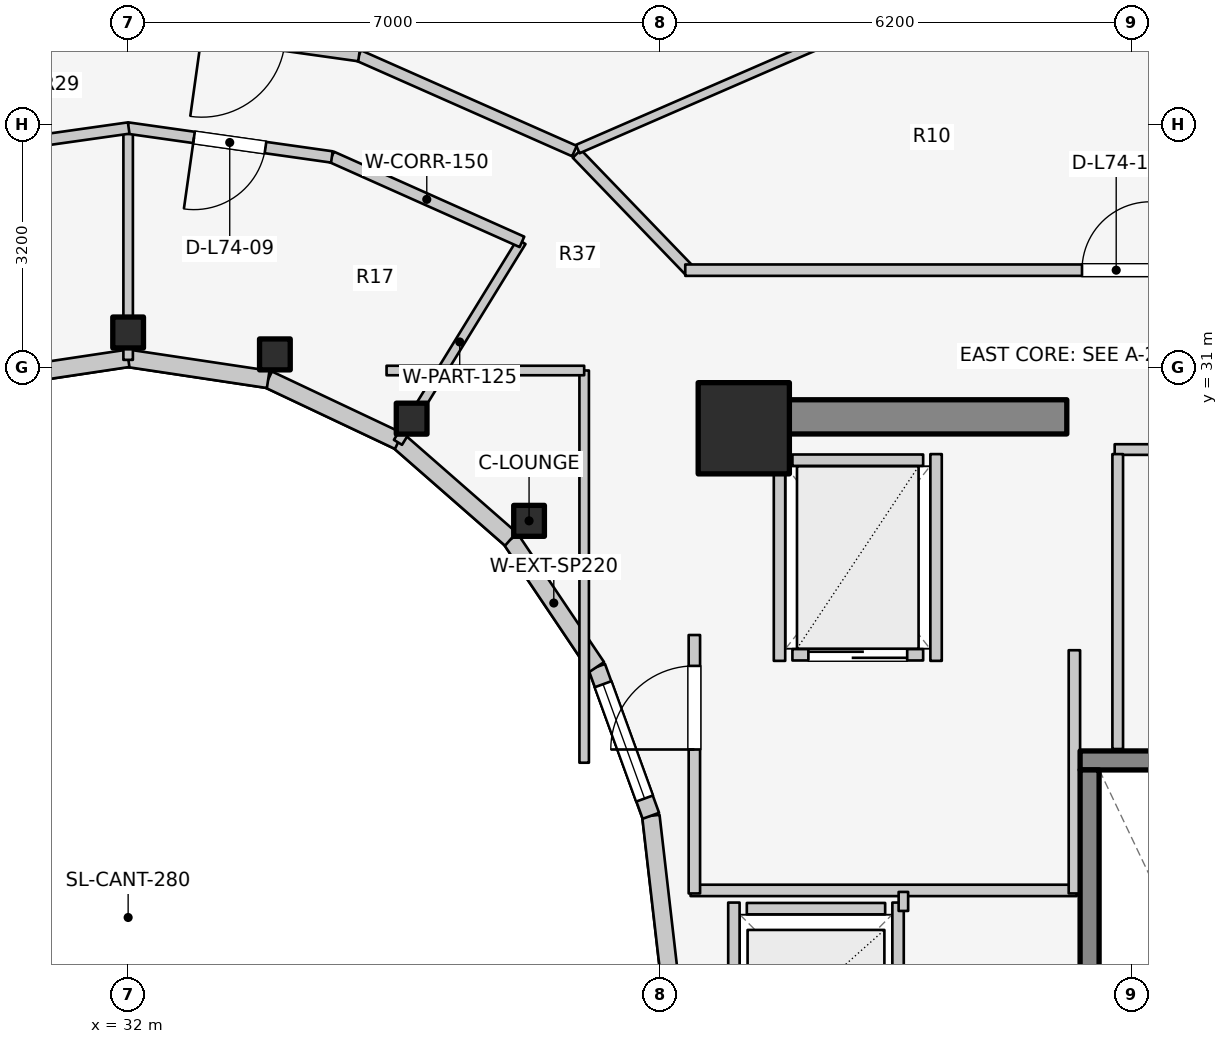
"""IFC4 building model, lengths in metres.
Left out: names, types, materials, properties, quantities, classifications, styles, units other than length and angle.
Written with IfcOpenShell. Run it as: python <this file> out.ifc"""

import sys

from ifc_helpers import new_model, si_unit, direction, frame, frame_2d, origin, origin_2d, place, context, subcontext, project, spatial, rectangle, i_section, extrude, element, fill, save


model = new_model("IFC4")
c1 = context("Model", 3, precision=1e-05, world=origin(), true_north=direction((0.0, 1.0)))
c2 = subcontext(c1, "Body", "Model", "MODEL_VIEW")
j1 = project(units=[si_unit("LENGTHUNIT", "METRE"), si_unit("PLANEANGLEUNIT", "RADIAN")], contexts=[c1])
p1 = place(None, origin())
s1 = spatial("IfcSite", under=j1, at=p1, CompositionType="ELEMENT")
p2 = place(p1, origin())
s2 = spatial("IfcBuilding", under=s1, at=p2, CompositionType="ELEMENT")
p3 = place(p2, frame((0.0, 0.0, 242.4)))
s3 = spatial("IfcBuildingStorey", under=s2, at=p3, CompositionType="ELEMENT", Elevation=242.4)
p4 = place(p3, frame((39.85, 30.35, 0.0), z_axis=(0.0, 0.0, 1.0), x_axis=(1.0, 0.0, 0.0)))
e1 = element("IfcWall", 1, at=p4, inside=s3, PredefinedType="SHEAR", context=c2, shape_type="SweptSolid", body=[
    extrude(rectangle(XDim=4.5, YDim=0.45, at=frame_2d((2.25, 0.0))), origin(), (0.0, 0.0, 1.0), 3.6),
])
p5 = place(p3, frame((44.525, 25.83, 0.0), z_axis=(0.0, 0.0, 1.0), x_axis=(1.0, 0.0, 0.0)))
e2 = element("IfcWall", 2, at=p5, inside=s3, PredefinedType="SOLIDWALL", context=c2, shape_type="SweptSolid", body=[
    extrude(rectangle(XDim=3.37, YDim=0.25, at=frame_2d((1.685, 0.0))), origin(), (0.0, 0.0, 1.0), 3.6),
])
p6 = place(p3, frame((44.65, 17.895, 0.0), z_axis=(0.0, 0.0, 1.0), x_axis=(0.0, 1.0, 0.0)))
e3 = element("IfcWall", 3, at=p6, inside=s3, PredefinedType="SOLIDWALL", context=c2, shape_type="SweptSolid", body=[
    extrude(rectangle(XDim=7.81, YDim=0.25, at=frame_2d((3.905, 0.0))), origin(), (0.0, 0.0, 1.0), 3.6),
])
p7 = place(p3, frame((40.1, 30.2, 0.0), z_axis=(0.0, 0.0, 1.0), x_axis=(1.0, 0.0, 0.0)))
e4 = element("IfcColumn", 4, at=p7, inside=s3, PredefinedType="COLUMN", context=c2, shape_type="SweptSolid", body=[
    extrude(rectangle(XDim=1.2, YDim=1.2, at=origin_2d()), origin(), (0.0, 0.0, 1.0), 3.6),
])
for number, where, z_axis, x_axis in (
    (5, (37.275, 28.982, 0.0), (0.0, 0.0, 1.0), (1.0, 0.0, 0.0)),
    (6, (35.73, 30.327, 0.0), (0.0, 0.0, 1.0), (1.0, 0.0, 0.0)),
    (7, (33.931, 31.172, 0.0), (0.0, 0.0, 1.0), (1.0, 0.0, 0.0)),
    (8, (32.0, 31.46, 0.0), (0.0, 0.0, 1.0), (1.0, 0.0, 0.0)),
):
    element("IfcColumn", number, at=place(p3, frame(where, z_axis=z_axis, x_axis=x_axis)), inside=s3, PredefinedType="COLUMN", context=c2, shape_type="SweptSolid", body=[
        extrude(i_section(OverallWidth=0.404, OverallDepth=0.407, WebThickness=0.027, FlangeThickness=0.044, FilletRadius=0.025, at=origin_2d()), origin(), (0.0, 0.0, 1.0), 3.6),
    ])
p8 = place(p3, frame((39.12, 23.0, 0.0), z_axis=(0.0, 0.0, 1.0), x_axis=(-0.114711713601, 0.993398823617, 0.0)))
e9 = element("IfcWall", 9, at=p8, inside=s3, PredefinedType="STANDARD", context=c2, shape_type="SweptSolid", body=[
    extrude(rectangle(XDim=2.115, YDim=0.23, at=frame_2d((1.058, 0.0))), origin(), (0.0, 0.0, 1.0), 3.28),
])
p9 = place(p3, frame((38.877, 25.102, 0.0), z_axis=(0.0, 0.0, 1.0), x_axis=(-0.341423187295, 0.93990968033, 0.0)))
e10 = element("IfcWall", 10, at=p9, inside=s3, PredefinedType="STANDARD", context=c2, shape_type="SweptSolid", body=[
    extrude(rectangle(XDim=2.084, YDim=0.23, at=frame_2d((1.042, 0.0))), origin(), (0.0, 0.0, 1.0), 3.28),
])
p10 = place(p9, frame((0.242, 0.0, 0.85)))
e11 = element("IfcOpeningElement", 11, at=p10, cuts=e10, PredefinedType="OPENING", context=c2, shape_type="SweptSolid", body=[
    extrude(rectangle(XDim=1.6, YDim=1.65, at=frame_2d((0.8, 0.825))), frame((0.0, 0.125, 0.0), z_axis=(0.0, -1.0, 0.0), x_axis=(1.0, 0.0, 0.0)), (0.0, 0.0, 1.0), 0.25),
])
p11 = place(p3, frame((38.166, 27.06, 0.0), z_axis=(0.0, 0.0, 1.0), x_axis=(-0.558197800898, 0.829707909492, 0.0)))
e12 = element("IfcWall", 12, at=p11, inside=s3, PredefinedType="STANDARD", context=c2, shape_type="SweptSolid", body=[
    extrude(rectangle(XDim=2.027, YDim=0.23, at=frame_2d((1.013, 0.0))), origin(), (0.0, 0.0, 1.0), 2.6),
])
p12 = place(p3, frame((37.035, 28.742, 0.0), z_axis=(0.0, 0.0, 1.0), x_axis=(-0.752576694707, 0.658504607869, 0.0)))
e13 = element("IfcWall", 13, at=p12, inside=s3, PredefinedType="STANDARD", context=c2, shape_type="SweptSolid", body=[
    extrude(rectangle(XDim=1.959, YDim=0.23, at=frame_2d((0.98, 0.0))), origin(), (0.0, 0.0, 1.0), 2.6),
])
p13 = place(p3, frame((35.56, 30.032, 0.0), z_axis=(0.0, 0.0, 1.0), x_axis=(-0.904179699603, 0.427152280606, 0.0)))
e14 = element("IfcWall", 14, at=p13, inside=s3, PredefinedType="STANDARD", context=c2, shape_type="SweptSolid", body=[
    extrude(rectangle(XDim=1.899, YDim=0.23, at=frame_2d((0.95, 0.0))), origin(), (0.0, 0.0, 1.0), 2.6),
])
for number, where, z_axis, x_axis in (
    (15, (33.843, 30.843, 0.0), (0.0, 0.0, 1.0), (-0.989, 0.149, 0.0)),
    (16, (32.0, 31.12, 0.0), (0.0, 0.0, 1.0), (-0.989, -0.149, 0.0)),
):
    element("IfcWall", number, at=place(p3, frame(where, z_axis=z_axis, x_axis=x_axis)), inside=s3, PredefinedType="STANDARD", context=c2, shape_type="SweptSolid", body=[
        extrude(rectangle(XDim=1.864, YDim=0.23, at=frame_2d((0.932, 0.0))), origin(), (0.0, 0.0, 1.0), 2.6),
    ])
p14 = place(p3, frame((47.558, 34.572, 0.0), z_axis=(0.0, 0.0, 1.0), x_axis=(-0.668903560134, 0.743349196031, 0.0)))
e17 = element("IfcWall", 17, at=p14, inside=s3, PredefinedType="STANDARD", context=c2, shape_type="SweptSolid", body=[
    extrude(rectangle(XDim=5.513, YDim=0.26, at=frame_2d((2.756, 0.0))), origin(), (0.0, 0.0, 1.0), 3.29),
])
p15 = place(p3, frame((40.14, 23.88, 0.0), z_axis=(0.0, 0.0, 1.0), x_axis=(1.0, 0.0, 0.0)))
e18 = element("IfcWall", 18, at=p15, inside=s3, PredefinedType="SOLIDWALL", context=c2, shape_type="SweptSolid", body=[
    extrude(rectangle(XDim=1.82, YDim=0.15, at=frame_2d((0.91, 0.0))), origin(), (0.0, 0.0, 1.0), 2.62),
])
p16 = place(p3, frame((39.97, 21.64, 0.0), z_axis=(0.0, 0.0, 1.0), x_axis=(0.0, 1.0, 0.0)))
e19 = element("IfcWall", 19, at=p16, inside=s3, PredefinedType="SOLIDWALL", context=c2, shape_type="SweptSolid", body=[
    extrude(rectangle(XDim=2.32, YDim=0.15, at=frame_2d((1.16, 0.0))), origin(), (0.0, 0.0, 1.0), 2.62),
])
p17 = place(p3, frame((42.13, 21.64, 0.0), z_axis=(0.0, 0.0, 1.0), x_axis=(0.0, 1.0, 0.0)))
e20 = element("IfcWall", 20, at=p17, inside=s3, PredefinedType="SOLIDWALL", context=c2, shape_type="SweptSolid", body=[
    extrude(rectangle(XDim=2.32, YDim=0.15, at=frame_2d((1.16, 0.0))), origin(), (0.0, 0.0, 1.0), 3.295),
])
p18 = place(p3, frame((40.74, 27.22, 0.0), z_axis=(0.0, 0.0, 1.0), x_axis=(1.0, 0.0, 0.0)))
e21 = element("IfcWall", 21, at=p18, inside=s3, PredefinedType="SOLIDWALL", context=c2, shape_type="SweptSolid", body=[
    extrude(rectangle(XDim=1.72, YDim=0.15, at=frame_2d((0.86, 0.0))), origin(), (0.0, 0.0, 1.0), 3.295),
])
p19 = place(p18, frame((0.21, 0.0, 0.0)))
e22 = element("IfcOpeningElement", 22, at=p19, cuts=e21, PredefinedType="OPENING", context=c2, shape_type="SweptSolid", body=[
    extrude(rectangle(XDim=1.3, YDim=2.1, at=frame_2d((0.65, 1.05))), frame((0.0, 0.085, 0.0), z_axis=(0.0, -1.0, 0.0), x_axis=(1.0, 0.0, 0.0)), (0.0, 0.0, 1.0), 0.17),
])
p20 = place(p3, frame((40.74, 29.78, 0.0), z_axis=(0.0, 0.0, 1.0), x_axis=(1.0, 0.0, 0.0)))
e23 = element("IfcWall", 23, at=p20, inside=s3, PredefinedType="SOLIDWALL", context=c2, shape_type="SweptSolid", body=[
    extrude(rectangle(XDim=1.72, YDim=0.15, at=frame_2d((0.86, 0.0))), origin(), (0.0, 0.0, 1.0), 3.295),
])
for number, where, z_axis, x_axis in (
    (24, (40.57, 27.14, 0.0), (0.0, 0.0, 1.0), (0.0, 1.0, 0.0)),
    (25, (42.63, 27.14, 0.0), (0.0, 0.0, 1.0), (0.0, 1.0, 0.0)),
):
    element("IfcWall", number, at=place(p3, frame(where, z_axis=z_axis, x_axis=x_axis)), inside=s3, PredefinedType="SOLIDWALL", context=c2, shape_type="SweptSolid", body=[
        extrude(rectangle(XDim=2.72, YDim=0.15, at=frame_2d((1.36, 0.0))), origin(), (0.0, 0.0, 1.0), 3.295),
    ])
p21 = place(p3, frame((39.4, 24.12, 0.0), z_axis=(0.0, 0.0, 1.0), x_axis=(1.0, 0.0, 0.0)))
e26 = element("IfcWall", 26, at=p21, inside=s3, PredefinedType="PARTITIONING", context=c2, shape_type="SweptSolid", body=[
    extrude(rectangle(XDim=5.08, YDim=0.15, at=frame_2d((2.54, 0.0))), origin(), (0.0, 0.0, 1.0), 2.62),
])
p22 = place(p3, frame((44.45, 24.08, 0.0), z_axis=(0.0, 0.0, 1.0), x_axis=(0.0, 1.0, 0.0)))
e27 = element("IfcWall", 27, at=p22, inside=s3, PredefinedType="PARTITIONING", context=c2, shape_type="SweptSolid", body=[
    extrude(rectangle(XDim=3.2, YDim=0.15, at=frame_2d((1.6, 0.0))), origin(), (0.0, 0.0, 1.0), 3.295),
])
p23 = place(p3, frame((39.45, 24.08, 0.0), z_axis=(0.0, 0.0, 1.0), x_axis=(0.0, 1.0, 0.0)))
e28 = element("IfcWall", 28, at=p23, inside=s3, PredefinedType="PARTITIONING", context=c2, shape_type="SweptSolid", body=[
    extrude(rectangle(XDim=3.4, YDim=0.15, at=frame_2d((1.7, 0.0))), origin(), (0.0, 0.0, 1.0), 3.295),
])
p24 = place(p23, frame((1.894, 0.0, 0.0)))
e29 = element("IfcOpeningElement", 29, at=p24, cuts=e28, PredefinedType="OPENING", context=c2, shape_type="SweptSolid", body=[
    extrude(rectangle(XDim=1.1, YDim=2.1, at=frame_2d((0.55, 1.05))), frame((0.0, 0.085, 0.0), z_axis=(0.0, -1.0, 0.0), x_axis=(1.0, 0.0, 0.0)), (0.0, 0.0, 1.0), 0.17),
])
p25 = place(p3, frame((42.2, 23.85, 0.0), z_axis=(0.0, 0.0, 1.0), x_axis=(0.0, 1.0, 0.0)))
e30 = element("IfcWall", 30, at=p25, inside=s3, PredefinedType="PARTITIONING", context=c2, shape_type="SweptSolid", body=[
    extrude(rectangle(XDim=0.25, YDim=0.125, at=frame_2d((0.125, 0.0))), origin(), (0.0, 0.0, 1.0), 3.295),
])
p26 = place(p3, frame((44.98, 29.92, 0.0), z_axis=(0.0, 0.0, 1.0), x_axis=(1.0, 0.0, 0.0)))
e31 = element("IfcWall", 31, at=p26, inside=s3, PredefinedType="PLUMBINGWALL", context=c2, shape_type="SweptSolid", body=[
    extrude(rectangle(XDim=2.9, YDim=0.14, at=frame_2d((1.45, 0.0))), origin(), (0.0, 0.0, 1.0), 3.295),
])
p27 = place(p26, frame((0.686, 0.0, 0.0)))
e32 = element("IfcOpeningElement", 32, at=p27, cuts=e31, PredefinedType="OPENING", context=c2, shape_type="SweptSolid", body=[
    extrude(rectangle(XDim=0.85, YDim=2.05, at=frame_2d((0.425, 1.025))), frame((0.0, 0.08, 0.0), z_axis=(0.0, -1.0, 0.0), x_axis=(1.0, 0.0, 0.0)), (0.0, 0.0, 1.0), 0.16),
])
p28 = place(p3, frame((45.02, 25.98, 0.0), z_axis=(0.0, 0.0, 1.0), x_axis=(0.0, 1.0, 0.0)))
e33 = element("IfcWall", 33, at=p28, inside=s3, PredefinedType="PLUMBINGWALL", context=c2, shape_type="SweptSolid", body=[
    extrude(rectangle(XDim=3.88, YDim=0.14, at=frame_2d((1.94, 0.0))), origin(), (0.0, 0.0, 1.0), 3.295),
])
p29 = place(p3, frame((35.55, 30.015, 0.0), z_axis=(0.0, 0.0, 1.0), x_axis=(0.523992004803, 0.851723182086, 0.0)))
e34 = element("IfcWall", 34, at=p29, inside=s3, PredefinedType="PARTITIONING", context=c2, shape_type="SweptSolid", body=[
    extrude(rectangle(XDim=3.101, YDim=0.125, at=frame_2d((1.551, 0.0))), origin(), (0.0, 0.0, 1.0), 2.672),
])
p30 = place(p3, frame((32.0, 31.1, 0.0), z_axis=(0.0, 0.0, 1.0), x_axis=(0.0, 1.0, 0.0)))
e35 = element("IfcWall", 35, at=p30, inside=s3, PredefinedType="PARTITIONING", context=c2, shape_type="SweptSolid", body=[
    extrude(rectangle(XDim=3.05, YDim=0.125, at=frame_2d((1.525, 0.0))), origin(), (0.0, 0.0, 1.0), 2.672),
])
p31 = place(p3, frame((37.181, 32.652, 0.0), z_axis=(0.0, 0.0, 1.0), x_axis=(-0.913120130558, 0.407690602257, 0.0)))
e36 = element("IfcWall", 36, at=p31, inside=s3, PredefinedType="PARTITIONING", context=c2, shape_type="SweptSolid", body=[
    extrude(rectangle(XDim=2.743, YDim=0.15, at=frame_2d((1.371, 0.0))), origin(), (0.0, 0.0, 1.0), 2.823),
])
p32 = place(p3, frame((34.68, 33.77, 0.0), z_axis=(0.0, 0.0, 1.0), x_axis=(-0.990132151456, 0.140136799779, 0.0)))
e37 = element("IfcWall", 37, at=p32, inside=s3, PredefinedType="PARTITIONING", context=c2, shape_type="SweptSolid", body=[
    extrude(rectangle(XDim=2.714, YDim=0.15, at=frame_2d((1.357, 0.0))), origin(), (0.0, 0.0, 1.0), 2.823),
])
p33 = place(p32, frame((0.882, 0.0, 0.0)))
e38 = element("IfcOpeningElement", 38, at=p33, cuts=e37, PredefinedType="OPENING", context=c2, shape_type="SweptSolid", body=[
    extrude(rectangle(XDim=0.95, YDim=2.1, at=frame_2d((0.475, 1.05))), frame((0.0, 0.085, 0.0), z_axis=(0.0, -1.0, 0.0), x_axis=(1.0, 0.0, 0.0)), (0.0, 0.0, 1.0), 0.17),
])
p34 = place(p3, frame((32.007, 34.15, 0.0), z_axis=(0.0, 0.0, 1.0), x_axis=(-0.990132151456, -0.140136799779, 0.0)))
e39 = element("IfcWall", 39, at=p34, inside=s3, PredefinedType="PARTITIONING", context=c2, shape_type="SweptSolid", body=[
    extrude(rectangle(XDim=2.714, YDim=0.15, at=frame_2d((1.357, 0.0))), origin(), (0.0, 0.0, 1.0), 2.823),
])
p35 = place(p3, frame((38.0, 25.8, 0.0), z_axis=(0.0, 0.0, 1.0), x_axis=(0.0, 1.0, 0.0)))
e40 = element("IfcWall", 40, at=p35, inside=s3, PredefinedType="PARTITIONING", context=c2, shape_type="SweptSolid", body=[
    extrude(rectangle(XDim=5.16, YDim=0.125, at=frame_2d((2.58, 0.0))), origin(), (0.0, 0.0, 1.0), 2.672),
])
p36 = place(p3, frame((35.4, 30.96, 0.0), z_axis=(0.0, 0.0, 1.0), x_axis=(1.0, 0.0, 0.0)))
e41 = element("IfcWall", 41, at=p36, inside=s3, PredefinedType="PARTITIONING", context=c2, shape_type="SweptSolid", body=[
    extrude(rectangle(XDim=2.6, YDim=0.125, at=frame_2d((1.3, 0.0))), origin(), (0.0, 0.0, 1.0), 2.816),
])
p37 = place(p3, frame((37.903, 33.812, 0.0), z_axis=(0.0, 0.0, 1.0), x_axis=(0.694032962553, -0.719943224768, 0.0)))
e42 = element("IfcWall", 42, at=p37, inside=s3, PredefinedType="PARTITIONING", context=c2, shape_type="SweptSolid", body=[
    extrude(rectangle(XDim=2.158, YDim=0.15, at=frame_2d((1.079, 0.0))), origin(), (0.0, 0.0, 1.0), 2.816),
])
p38 = place(p3, frame((39.33, 32.28, 0.0), z_axis=(0.0, 0.0, 1.0), x_axis=(1.0, 0.0, 0.0)))
e43 = element("IfcWall", 43, at=p38, inside=s3, PredefinedType="PARTITIONING", context=c2, shape_type="SweptSolid", body=[
    extrude(rectangle(XDim=7.52, YDim=0.15, at=frame_2d((3.76, 0.0))), origin(), (0.0, 0.0, 1.0), 2.816),
])
p39 = place(p38, frame((5.22, 0.0, 0.0)))
e44 = element("IfcOpeningElement", 44, at=p39, cuts=e43, PredefinedType="OPENING", context=c2, shape_type="SweptSolid", body=[
    extrude(rectangle(XDim=0.9, YDim=2.1, at=frame_2d((0.45, 1.05))), frame((0.0, 0.085, 0.0), z_axis=(0.0, -1.0, 0.0), x_axis=(1.0, 0.0, 0.0)), (0.0, 0.0, 1.0), 0.17),
])
p40 = place(p3, frame((37.915, 33.873, 0.0), z_axis=(0.0, 0.0, 1.0), x_axis=(0.916946661839, 0.399009798554, 0.0)))
e45 = element("IfcWall", 45, at=p40, inside=s3, PredefinedType="MOVABLE", context=c2, shape_type="SweptSolid", body=[
    extrude(rectangle(XDim=6.042, YDim=0.12, at=frame_2d((3.021, 0.0))), origin(), (0.0, 0.0, 1.0), 2.66),
])
p41 = place(p3, frame((37.872, 33.847, 0.0), z_axis=(0.0, 0.0, 1.0), x_axis=(-0.914384748819, 0.404846305563, 0.0)))
e46 = element("IfcWall", 46, at=p41, inside=s3, PredefinedType="PARTITIONING", context=c2, shape_type="SweptSolid", body=[
    extrude(rectangle(XDim=3.104, YDim=0.15, at=frame_2d((1.552, 0.0))), origin(), (0.0, 0.0, 1.0), 2.823),
])
p42 = place(p3, frame((35.038, 35.103, 0.0), z_axis=(0.0, 0.0, 1.0), x_axis=(-0.990295701983, 0.138976338396, 0.0)))
e47 = element("IfcWall", 47, at=p42, inside=s3, PredefinedType="PARTITIONING", context=c2, shape_type="SweptSolid", body=[
    extrude(rectangle(XDim=3.076, YDim=0.15, at=frame_2d((1.538, 0.0))), origin(), (0.0, 0.0, 1.0), 2.823),
])
p43 = place(p42, frame((0.988, 0.0, 0.0)))
e48 = element("IfcOpeningElement", 48, at=p43, cuts=e47, PredefinedType="OPENING", context=c2, shape_type="SweptSolid", body=[
    extrude(rectangle(XDim=1.1, YDim=2.1, at=frame_2d((0.55, 1.05))), frame((0.0, 0.085, 0.0), z_axis=(0.0, -1.0, 0.0), x_axis=(1.0, 0.0, 0.0)), (0.0, 0.0, 1.0), 0.17),
])
p44 = place(p3, frame((32.008, 35.53, 0.0), z_axis=(0.0, 0.0, 1.0), x_axis=(-0.990295701983, -0.138976338396, 0.0)))
e49 = element("IfcWall", 49, at=p44, inside=s3, PredefinedType="PARTITIONING", context=c2, shape_type="SweptSolid", body=[
    extrude(rectangle(XDim=3.076, YDim=0.15, at=frame_2d((1.538, 0.0))), origin(), (0.0, 0.0, 1.0), 2.823),
])
p45 = place(p10, origin())
e50 = element("IfcWindow", 50, at=p45, inside=s3, PartitioningType="SINGLE_PANEL", PredefinedType="WINDOW", context=c2, shape_type="SweptSolid", body=[
    extrude(rectangle(XDim=1.6, YDim=1.65, at=frame_2d((0.8, 0.825))), frame((0.0, 0.03, 0.0), z_axis=(0.0, -1.0, 0.0), x_axis=(1.0, 0.0, 0.0)), (0.0, 0.0, 1.0), 0.06),
])
fill(e11, e50)
p46 = place(p19, origin())
e51 = element("IfcDoor", 51, at=p46, inside=s3, OperationType="DOUBLE_DOOR_SLIDING", PredefinedType="DOOR", context=c2, shape_type="SweptSolid", body=[
    extrude(rectangle(XDim=1.3, YDim=2.1, at=frame_2d((0.65, 1.05))), frame((0.0, 0.025, 0.0), z_axis=(0.0, -1.0, 0.0), x_axis=(1.0, 0.0, 0.0)), (0.0, 0.0, 1.0), 0.05),
])
fill(e22, e51)
p47 = place(p24, origin())
e52 = element("IfcDoor", 52, at=p47, inside=s3, OperationType="SINGLE_SWING_LEFT", PredefinedType="DOOR", context=c2, shape_type="SweptSolid", body=[
    extrude(rectangle(XDim=1.1, YDim=2.1, at=frame_2d((0.55, 1.05))), frame((0.0, 0.025, 0.0), z_axis=(0.0, -1.0, 0.0), x_axis=(1.0, 0.0, 0.0)), (0.0, 0.0, 1.0), 0.05),
])
fill(e29, e52)
p48 = place(p33, origin())
e53 = element("IfcDoor", 53, at=p48, inside=s3, OperationType="SINGLE_SWING_RIGHT", PredefinedType="DOOR", context=c2, shape_type="SweptSolid", body=[
    extrude(rectangle(XDim=0.95, YDim=2.1, at=frame_2d((0.475, 1.05))), frame((0.0, 0.025, 0.0), z_axis=(0.0, -1.0, 0.0), x_axis=(1.0, 0.0, 0.0)), (0.0, 0.0, 1.0), 0.05),
])
fill(e38, e53)
p49 = place(p39, origin())
e54 = element("IfcDoor", 54, at=p49, inside=s3, OperationType="SINGLE_SWING_RIGHT", PredefinedType="DOOR", context=c2, shape_type="SweptSolid", body=[
    extrude(rectangle(XDim=0.9, YDim=2.1, at=frame_2d((0.45, 1.05))), frame((0.0, 0.025, 0.0), z_axis=(0.0, -1.0, 0.0), x_axis=(1.0, 0.0, 0.0)), (0.0, 0.0, 1.0), 0.05),
])
fill(e44, e54)
save(model, sys.argv[1])
